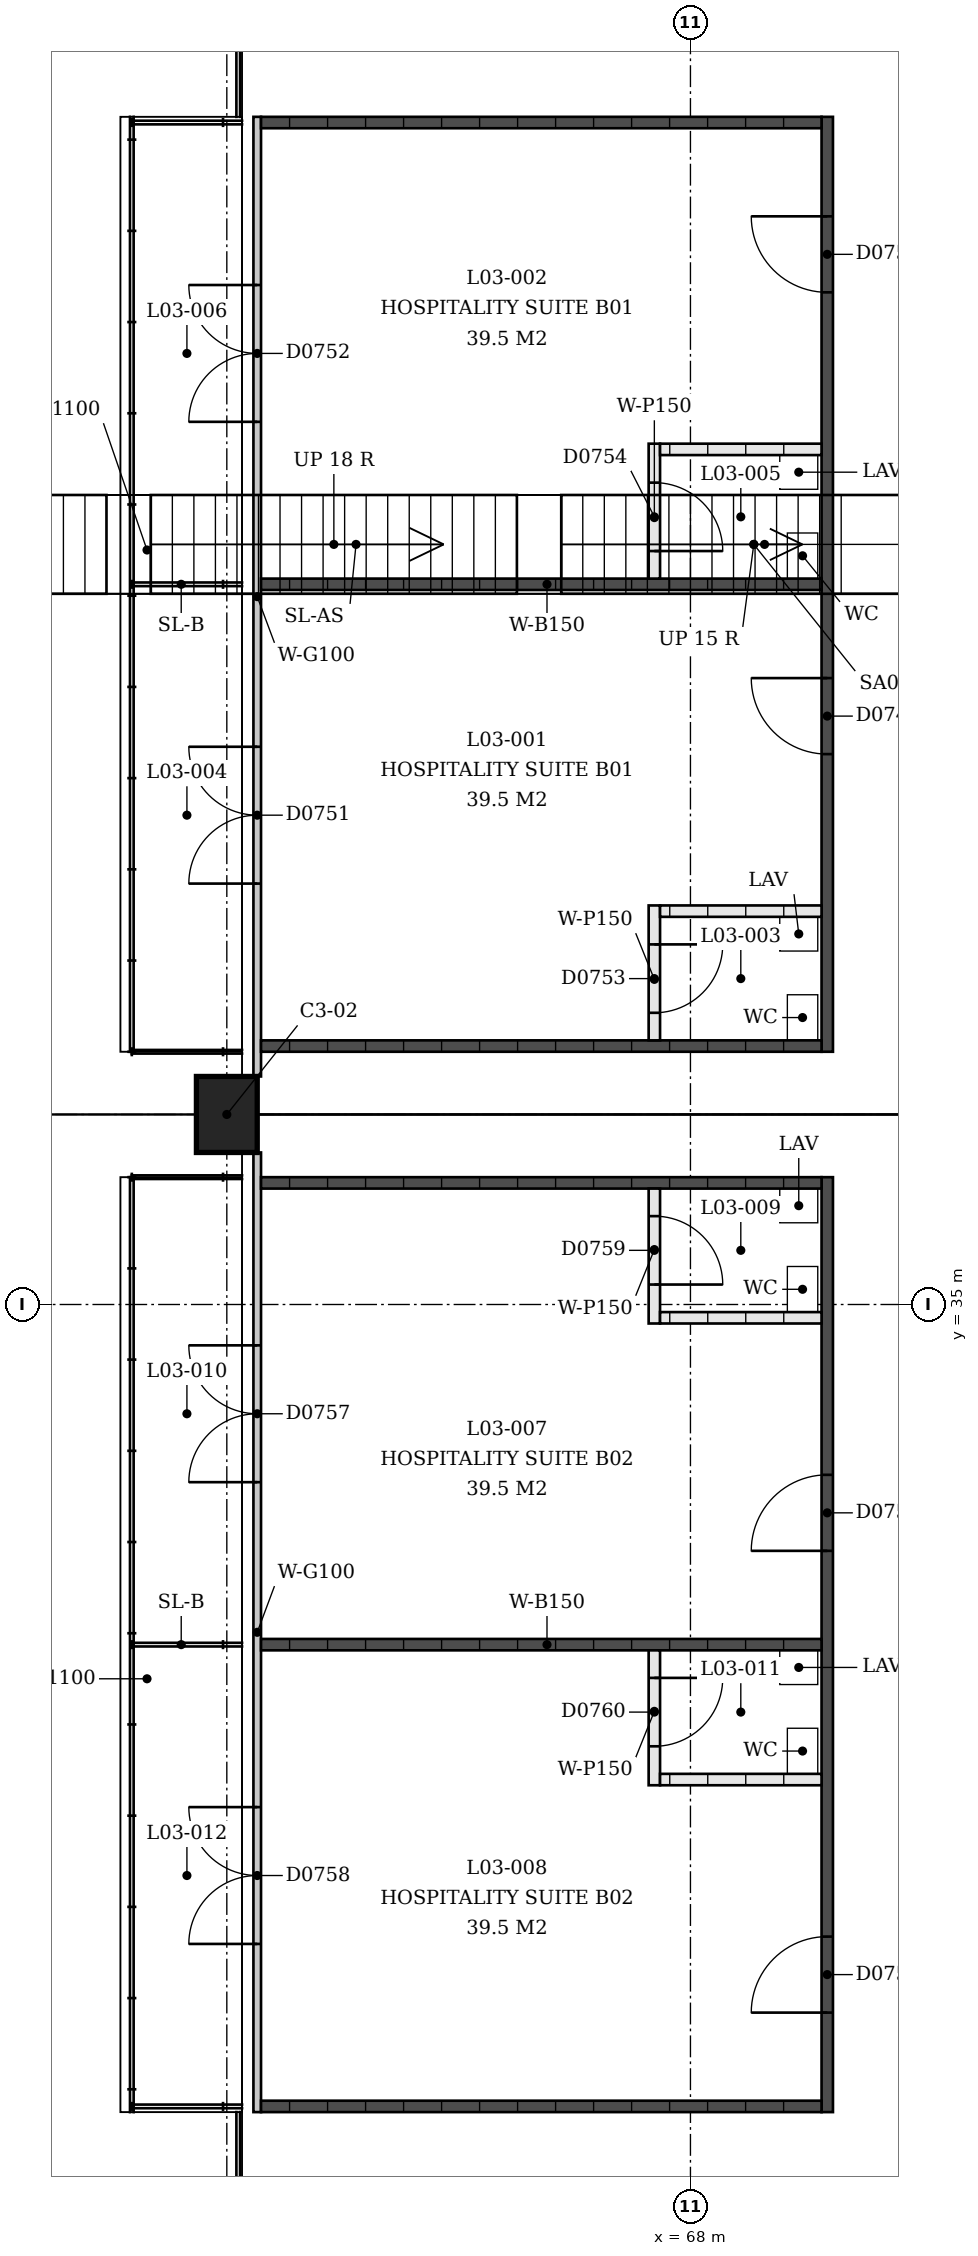
"""IFC4 building model, lengths in metres.
Left out: names, types, materials, properties, quantities, classifications, styles, units other than length and angle.
Written with IfcOpenShell. Run it as: python <this file> out.ifc"""

import sys

from ifc_helpers import new_model, si_unit, direction, frame, frame_2d, origin, origin_2d, place, context, subcontext, project, spatial, rectangle, extrude, element, fill, save


model = new_model("IFC4")
c1 = context("Model", 3, precision=1e-05, world=origin(), true_north=direction((0.0, 1.0)))
c2 = subcontext(c1, "Body", "Model", "MODEL_VIEW")
j1 = project(units=[si_unit("LENGTHUNIT", "METRE"), si_unit("PLANEANGLEUNIT", "RADIAN")], contexts=[c1])
p1 = place(None, origin())
s1 = spatial("IfcSite", under=j1, at=p1, CompositionType="ELEMENT")
p2 = place(p1, origin())
s2 = spatial("IfcBuilding", under=s1, at=p2, CompositionType="ELEMENT")
p3 = place(p2, frame((0.0, 0.0, 13.5)))
s3 = spatial("IfcBuildingStorey", under=s2, at=p3, CompositionType="ELEMENT", Elevation=13.5)
p4 = place(p3, frame((61.9, 37.5, 0.0), z_axis=(0.0, 0.0, 1.0), x_axis=(0.0, 1.0, 0.0)))
e1 = element("IfcColumn", 1, at=p4, inside=s3, PredefinedType="COLUMN", context=c2, shape_type="SweptSolid", body=[
    extrude(rectangle(XDim=1.0, YDim=0.8, at=origin_2d()), origin(), (0.0, 0.0, 1.0), 2.033),
])
p5 = place(p3, frame((62.3, 38.0, 0.0), z_axis=(0.0, 0.0, 1.0), x_axis=(0.0, 1.0, 0.0)))
e2 = element("IfcWall", 2, at=p5, inside=s3, PredefinedType="PARTITIONING", context=c2, shape_type="SweptSolid", body=[
    extrude(rectangle(XDim=12.625, YDim=0.1, at=frame_2d((6.312, 0.0))), origin(), (0.0, 0.0, 1.0), 3.0),
])
p6 = place(p5, frame((2.538, 0.0, 0.0)))
e3 = element("IfcOpeningElement", 3, at=p6, cuts=e2, PredefinedType="OPENING", context=c2, shape_type="SweptSolid", body=[
    extrude(rectangle(XDim=1.8, YDim=2.1, at=frame_2d((0.9, 1.05))), frame((0.0, 0.05, 0.0), z_axis=(0.0, -1.0, 0.0), x_axis=(1.0, 0.0, 0.0)), (0.0, 0.0, 1.0), 0.1),
])
p7 = place(p5, frame((8.613, 0.0, 0.0)))
e4 = element("IfcOpeningElement", 4, at=p7, cuts=e2, PredefinedType="OPENING", context=c2, shape_type="SweptSolid", body=[
    extrude(rectangle(XDim=1.8, YDim=2.1, at=frame_2d((0.9, 1.05))), frame((0.0, 0.05, 0.0), z_axis=(0.0, -1.0, 0.0), x_axis=(1.0, 0.0, 0.0)), (0.0, 0.0, 1.0), 0.1),
])
p8 = place(p3, frame((69.8, 38.325, 0.0), z_axis=(0.0, 0.0, 1.0), x_axis=(0.0, 1.0, 0.0)))
e5 = element("IfcWall", 5, at=p8, inside=s3, PredefinedType="SOLIDWALL", context=c2, shape_type="SweptSolid", body=[
    extrude(rectangle(XDim=12.3, YDim=0.15, at=frame_2d((6.15, 0.0))), origin(), (0.0, 0.0, 1.0), 3.0),
])
p9 = place(p8, frame((3.916, 0.0, 0.0)))
e6 = element("IfcOpeningElement", 6, at=p9, cuts=e5, PredefinedType="OPENING", context=c2, shape_type="SweptSolid", body=[
    extrude(rectangle(XDim=1.0, YDim=2.1, at=frame_2d((0.5, 1.05))), frame((0.0, 0.075, 0.0), z_axis=(0.0, -1.0, 0.0), x_axis=(1.0, 0.0, 0.0)), (0.0, 0.0, 1.0), 0.15),
])
p10 = place(p8, frame((9.991, 0.0, 0.0)))
e7 = element("IfcOpeningElement", 7, at=p10, cuts=e5, PredefinedType="OPENING", context=c2, shape_type="SweptSolid", body=[
    extrude(rectangle(XDim=1.0, YDim=2.1, at=frame_2d((0.5, 1.05))), frame((0.0, 0.075, 0.0), z_axis=(0.0, -1.0, 0.0), x_axis=(1.0, 0.0, 0.0)), (0.0, 0.0, 1.0), 0.15),
])
for number, where, z_axis, x_axis in (
    (8, (62.35, 38.4, 0.0), (0.0, 0.0, 1.0), (1.0, 0.0, 0.0)),
    (9, (62.35, 44.475, 0.0), (0.0, 0.0, 1.0), (1.0, 0.0, 0.0)),
    (10, (62.35, 50.55, 0.0), (0.0, 0.0, 1.0), (1.0, 0.0, 0.0)),
):
    element("IfcWall", number, at=place(p3, frame(where, z_axis=z_axis, x_axis=x_axis)), inside=s3, PredefinedType="SOLIDWALL", context=c2, shape_type="SweptSolid", body=[
        extrude(rectangle(XDim=7.375, YDim=0.15, at=frame_2d((3.688, 0.0))), origin(), (0.0, 0.0, 1.0), 3.0),
    ])
p11 = place(p3, frame((67.525, 38.475, 0.0), z_axis=(0.0, 0.0, 1.0), x_axis=(0.0, 1.0, 0.0)))
e11 = element("IfcWall", 11, at=p11, inside=s3, PredefinedType="PARTITIONING", context=c2, shape_type="SweptSolid", body=[
    extrude(rectangle(XDim=1.775, YDim=0.15, at=frame_2d((0.887, 0.0))), origin(), (0.0, 0.0, 1.0), 3.0),
])
p12 = place(p11, frame((0.363, 0.0, 0.0)))
e12 = element("IfcOpeningElement", 12, at=p12, cuts=e11, PredefinedType="OPENING", context=c2, shape_type="SweptSolid", body=[
    extrude(rectangle(XDim=0.9, YDim=2.1, at=frame_2d((0.45, 1.05))), frame((0.0, 0.075, 0.0), z_axis=(0.0, -1.0, 0.0), x_axis=(1.0, 0.0, 0.0)), (0.0, 0.0, 1.0), 0.15),
])
p13 = place(p3, frame((67.6, 40.175, 0.0), z_axis=(0.0, 0.0, 1.0), x_axis=(1.0, 0.0, 0.0)))
e13 = element("IfcWall", 13, at=p13, inside=s3, PredefinedType="PARTITIONING", context=c2, shape_type="SweptSolid", body=[
    extrude(rectangle(XDim=2.125, YDim=0.15, at=frame_2d((1.062, 0.0))), origin(), (0.0, 0.0, 1.0), 3.0),
])
p14 = place(p3, frame((67.525, 44.55, 0.0), z_axis=(0.0, 0.0, 1.0), x_axis=(0.0, 1.0, 0.0)))
e14 = element("IfcWall", 14, at=p14, inside=s3, PredefinedType="PARTITIONING", context=c2, shape_type="SweptSolid", body=[
    extrude(rectangle(XDim=1.775, YDim=0.15, at=frame_2d((0.887, 0.0))), origin(), (0.0, 0.0, 1.0), 3.0),
])
p15 = place(p14, frame((0.363, 0.0, 0.0)))
e15 = element("IfcOpeningElement", 15, at=p15, cuts=e14, PredefinedType="OPENING", context=c2, shape_type="SweptSolid", body=[
    extrude(rectangle(XDim=0.9, YDim=2.1, at=frame_2d((0.45, 1.05))), frame((0.0, 0.075, 0.0), z_axis=(0.0, -1.0, 0.0), x_axis=(1.0, 0.0, 0.0)), (0.0, 0.0, 1.0), 0.15),
])
p16 = place(p3, frame((67.6, 46.25, 0.0), z_axis=(0.0, 0.0, 1.0), x_axis=(1.0, 0.0, 0.0)))
e16 = element("IfcWall", 16, at=p16, inside=s3, PredefinedType="PARTITIONING", context=c2, shape_type="SweptSolid", body=[
    extrude(rectangle(XDim=2.125, YDim=0.15, at=frame_2d((1.062, 0.0))), origin(), (0.0, 0.0, 1.0), 3.0),
])
p17 = place(p3, frame((62.3, 37.0, 0.0), z_axis=(0.0, 0.0, 1.0), x_axis=(0.0, -1.0, 0.0)))
e17 = element("IfcWall", 17, at=p17, inside=s3, PredefinedType="PARTITIONING", context=c2, shape_type="SweptSolid", body=[
    extrude(rectangle(XDim=12.625, YDim=0.1, at=frame_2d((6.312, 0.0))), origin(), (0.0, 0.0, 1.0), 3.0),
])
p18 = place(p17, frame((2.538, 0.0, 0.0)))
e18 = element("IfcOpeningElement", 18, at=p18, cuts=e17, PredefinedType="OPENING", context=c2, shape_type="SweptSolid", body=[
    extrude(rectangle(XDim=1.8, YDim=2.1, at=frame_2d((0.9, 1.05))), frame((0.0, 0.05, 0.0), z_axis=(0.0, -1.0, 0.0), x_axis=(1.0, 0.0, 0.0)), (0.0, 0.0, 1.0), 0.1),
])
p19 = place(p17, frame((8.613, 0.0, 0.0)))
e19 = element("IfcOpeningElement", 19, at=p19, cuts=e17, PredefinedType="OPENING", context=c2, shape_type="SweptSolid", body=[
    extrude(rectangle(XDim=1.8, YDim=2.1, at=frame_2d((0.9, 1.05))), frame((0.0, 0.05, 0.0), z_axis=(0.0, -1.0, 0.0), x_axis=(1.0, 0.0, 0.0)), (0.0, 0.0, 1.0), 0.1),
])
p20 = place(p3, frame((69.8, 36.675, 0.0), z_axis=(0.0, 0.0, 1.0), x_axis=(0.0, -1.0, 0.0)))
e20 = element("IfcWall", 20, at=p20, inside=s3, PredefinedType="SOLIDWALL", context=c2, shape_type="SweptSolid", body=[
    extrude(rectangle(XDim=12.3, YDim=0.15, at=frame_2d((6.15, 0.0))), origin(), (0.0, 0.0, 1.0), 3.0),
])
p21 = place(p20, frame((3.916, 0.0, 0.0)))
e21 = element("IfcOpeningElement", 21, at=p21, cuts=e20, PredefinedType="OPENING", context=c2, shape_type="SweptSolid", body=[
    extrude(rectangle(XDim=1.0, YDim=2.1, at=frame_2d((0.5, 1.05))), frame((0.0, 0.075, 0.0), z_axis=(0.0, -1.0, 0.0), x_axis=(1.0, 0.0, 0.0)), (0.0, 0.0, 1.0), 0.15),
])
p22 = place(p20, frame((9.991, 0.0, 0.0)))
e22 = element("IfcOpeningElement", 22, at=p22, cuts=e20, PredefinedType="OPENING", context=c2, shape_type="SweptSolid", body=[
    extrude(rectangle(XDim=1.0, YDim=2.1, at=frame_2d((0.5, 1.05))), frame((0.0, 0.075, 0.0), z_axis=(0.0, -1.0, 0.0), x_axis=(1.0, 0.0, 0.0)), (0.0, 0.0, 1.0), 0.15),
])
for number, where, z_axis, x_axis in (
    (23, (62.35, 36.6, 0.0), (0.0, 0.0, 1.0), (1.0, 0.0, 0.0)),
    (24, (62.35, 30.525, 0.0), (0.0, 0.0, 1.0), (1.0, 0.0, 0.0)),
    (25, (62.35, 24.45, 0.0), (0.0, 0.0, 1.0), (1.0, 0.0, 0.0)),
):
    element("IfcWall", number, at=place(p3, frame(where, z_axis=z_axis, x_axis=x_axis)), inside=s3, PredefinedType="SOLIDWALL", context=c2, shape_type="SweptSolid", body=[
        extrude(rectangle(XDim=7.375, YDim=0.15, at=frame_2d((3.688, 0.0))), origin(), (0.0, 0.0, 1.0), 3.0),
    ])
p23 = place(p3, frame((67.525, 36.525, 0.0), z_axis=(0.0, 0.0, 1.0), x_axis=(0.0, -1.0, 0.0)))
e26 = element("IfcWall", 26, at=p23, inside=s3, PredefinedType="PARTITIONING", context=c2, shape_type="SweptSolid", body=[
    extrude(rectangle(XDim=1.775, YDim=0.15, at=frame_2d((0.887, 0.0))), origin(), (0.0, 0.0, 1.0), 3.0),
])
p24 = place(p23, frame((0.363, 0.0, 0.0)))
e27 = element("IfcOpeningElement", 27, at=p24, cuts=e26, PredefinedType="OPENING", context=c2, shape_type="SweptSolid", body=[
    extrude(rectangle(XDim=0.9, YDim=2.1, at=frame_2d((0.45, 1.05))), frame((0.0, 0.075, 0.0), z_axis=(0.0, -1.0, 0.0), x_axis=(1.0, 0.0, 0.0)), (0.0, 0.0, 1.0), 0.15),
])
p25 = place(p3, frame((67.6, 34.825, 0.0), z_axis=(0.0, 0.0, 1.0), x_axis=(1.0, 0.0, 0.0)))
e28 = element("IfcWall", 28, at=p25, inside=s3, PredefinedType="PARTITIONING", context=c2, shape_type="SweptSolid", body=[
    extrude(rectangle(XDim=2.125, YDim=0.15, at=frame_2d((1.062, 0.0))), origin(), (0.0, 0.0, 1.0), 3.0),
])
p26 = place(p3, frame((67.525, 30.45, 0.0), z_axis=(0.0, 0.0, 1.0), x_axis=(0.0, -1.0, 0.0)))
e29 = element("IfcWall", 29, at=p26, inside=s3, PredefinedType="PARTITIONING", context=c2, shape_type="SweptSolid", body=[
    extrude(rectangle(XDim=1.775, YDim=0.15, at=frame_2d((0.887, 0.0))), origin(), (0.0, 0.0, 1.0), 3.0),
])
p27 = place(p26, frame((0.363, 0.0, 0.0)))
e30 = element("IfcOpeningElement", 30, at=p27, cuts=e29, PredefinedType="OPENING", context=c2, shape_type="SweptSolid", body=[
    extrude(rectangle(XDim=0.9, YDim=2.1, at=frame_2d((0.45, 1.05))), frame((0.0, 0.075, 0.0), z_axis=(0.0, -1.0, 0.0), x_axis=(1.0, 0.0, 0.0)), (0.0, 0.0, 1.0), 0.15),
])
p28 = place(p3, frame((67.6, 28.75, 0.0), z_axis=(0.0, 0.0, 1.0), x_axis=(1.0, 0.0, 0.0)))
e31 = element("IfcWall", 31, at=p28, inside=s3, PredefinedType="PARTITIONING", context=c2, shape_type="SweptSolid", body=[
    extrude(rectangle(XDim=2.125, YDim=0.15, at=frame_2d((1.062, 0.0))), origin(), (0.0, 0.0, 1.0), 3.0),
])
p29 = place(p9, origin())
e32 = element("IfcDoor", 32, at=p29, inside=s3, OperationType="SINGLE_SWING_LEFT", PredefinedType="DOOR", context=c2, shape_type="SweptSolid", body=[
    extrude(rectangle(XDim=1.0, YDim=2.1, at=frame_2d((0.5, 1.05))), frame((0.0, 0.025, 0.0), z_axis=(0.0, -1.0, 0.0), x_axis=(1.0, 0.0, 0.0)), (0.0, 0.0, 1.0), 0.05),
])
fill(e6, e32)
p30 = place(p10, origin())
e33 = element("IfcDoor", 33, at=p30, inside=s3, OperationType="SINGLE_SWING_LEFT", PredefinedType="DOOR", context=c2, shape_type="SweptSolid", body=[
    extrude(rectangle(XDim=1.0, YDim=2.1, at=frame_2d((0.5, 1.05))), frame((0.0, 0.025, 0.0), z_axis=(0.0, -1.0, 0.0), x_axis=(1.0, 0.0, 0.0)), (0.0, 0.0, 1.0), 0.05),
])
fill(e7, e33)
p31 = place(p6, origin())
e34 = element("IfcDoor", 34, at=p31, inside=s3, OperationType="DOUBLE_DOOR_SINGLE_SWING", PredefinedType="DOOR", context=c2, shape_type="SweptSolid", body=[
    extrude(rectangle(XDim=1.8, YDim=2.1, at=frame_2d((0.9, 1.05))), frame((0.0, 0.025, 0.0), z_axis=(0.0, -1.0, 0.0), x_axis=(1.0, 0.0, 0.0)), (0.0, 0.0, 1.0), 0.05),
])
fill(e3, e34)
p32 = place(p7, origin())
e35 = element("IfcDoor", 35, at=p32, inside=s3, OperationType="DOUBLE_DOOR_SINGLE_SWING", PredefinedType="DOOR", context=c2, shape_type="SweptSolid", body=[
    extrude(rectangle(XDim=1.8, YDim=2.1, at=frame_2d((0.9, 1.05))), frame((0.0, 0.025, 0.0), z_axis=(0.0, -1.0, 0.0), x_axis=(1.0, 0.0, 0.0)), (0.0, 0.0, 1.0), 0.05),
])
fill(e4, e35)
p33 = place(p12, origin())
e36 = element("IfcDoor", 36, at=p33, inside=s3, OperationType="SINGLE_SWING_RIGHT", PredefinedType="DOOR", context=c2, shape_type="SweptSolid", body=[
    extrude(rectangle(XDim=0.9, YDim=2.1, at=frame_2d((0.45, 1.05))), frame((0.0, 0.025, 0.0), z_axis=(0.0, -1.0, 0.0), x_axis=(1.0, 0.0, 0.0)), (0.0, 0.0, 1.0), 0.05),
])
fill(e12, e36)
p34 = place(p15, origin())
e37 = element("IfcDoor", 37, at=p34, inside=s3, OperationType="SINGLE_SWING_LEFT", PredefinedType="DOOR", context=c2, shape_type="SweptSolid", body=[
    extrude(rectangle(XDim=0.9, YDim=2.1, at=frame_2d((0.45, 1.05))), frame((0.0, 0.025, 0.0), z_axis=(0.0, -1.0, 0.0), x_axis=(1.0, 0.0, 0.0)), (0.0, 0.0, 1.0), 0.05),
])
fill(e15, e37)
p35 = place(p21, origin())
e38 = element("IfcDoor", 38, at=p35, inside=s3, OperationType="SINGLE_SWING_RIGHT", PredefinedType="DOOR", context=c2, shape_type="SweptSolid", body=[
    extrude(rectangle(XDim=1.0, YDim=2.1, at=frame_2d((0.5, 1.05))), frame((0.0, 0.025, 0.0), z_axis=(0.0, -1.0, 0.0), x_axis=(1.0, 0.0, 0.0)), (0.0, 0.0, 1.0), 0.05),
])
fill(e21, e38)
p36 = place(p22, origin())
e39 = element("IfcDoor", 39, at=p36, inside=s3, OperationType="SINGLE_SWING_RIGHT", PredefinedType="DOOR", context=c2, shape_type="SweptSolid", body=[
    extrude(rectangle(XDim=1.0, YDim=2.1, at=frame_2d((0.5, 1.05))), frame((0.0, 0.025, 0.0), z_axis=(0.0, -1.0, 0.0), x_axis=(1.0, 0.0, 0.0)), (0.0, 0.0, 1.0), 0.05),
])
fill(e22, e39)
p37 = place(p18, origin())
e40 = element("IfcDoor", 40, at=p37, inside=s3, OperationType="DOUBLE_DOOR_SINGLE_SWING", PredefinedType="DOOR", context=c2, shape_type="SweptSolid", body=[
    extrude(rectangle(XDim=1.8, YDim=2.1, at=frame_2d((0.9, 1.05))), frame((0.0, 0.025, 0.0), z_axis=(0.0, -1.0, 0.0), x_axis=(1.0, 0.0, 0.0)), (0.0, 0.0, 1.0), 0.05),
])
fill(e18, e40)
p38 = place(p19, origin())
e41 = element("IfcDoor", 41, at=p38, inside=s3, OperationType="DOUBLE_DOOR_SINGLE_SWING", PredefinedType="DOOR", context=c2, shape_type="SweptSolid", body=[
    extrude(rectangle(XDim=1.8, YDim=2.1, at=frame_2d((0.9, 1.05))), frame((0.0, 0.025, 0.0), z_axis=(0.0, -1.0, 0.0), x_axis=(1.0, 0.0, 0.0)), (0.0, 0.0, 1.0), 0.05),
])
fill(e19, e41)
p39 = place(p24, origin())
e42 = element("IfcDoor", 42, at=p39, inside=s3, OperationType="SINGLE_SWING_LEFT", PredefinedType="DOOR", context=c2, shape_type="SweptSolid", body=[
    extrude(rectangle(XDim=0.9, YDim=2.1, at=frame_2d((0.45, 1.05))), frame((0.0, 0.025, 0.0), z_axis=(0.0, -1.0, 0.0), x_axis=(1.0, 0.0, 0.0)), (0.0, 0.0, 1.0), 0.05),
])
fill(e27, e42)
p40 = place(p27, origin())
e43 = element("IfcDoor", 43, at=p40, inside=s3, OperationType="SINGLE_SWING_RIGHT", PredefinedType="DOOR", context=c2, shape_type="SweptSolid", body=[
    extrude(rectangle(XDim=0.9, YDim=2.1, at=frame_2d((0.45, 1.05))), frame((0.0, 0.025, 0.0), z_axis=(0.0, -1.0, 0.0), x_axis=(1.0, 0.0, 0.0)), (0.0, 0.0, 1.0), 0.05),
])
fill(e30, e43)
save(model, sys.argv[1])
